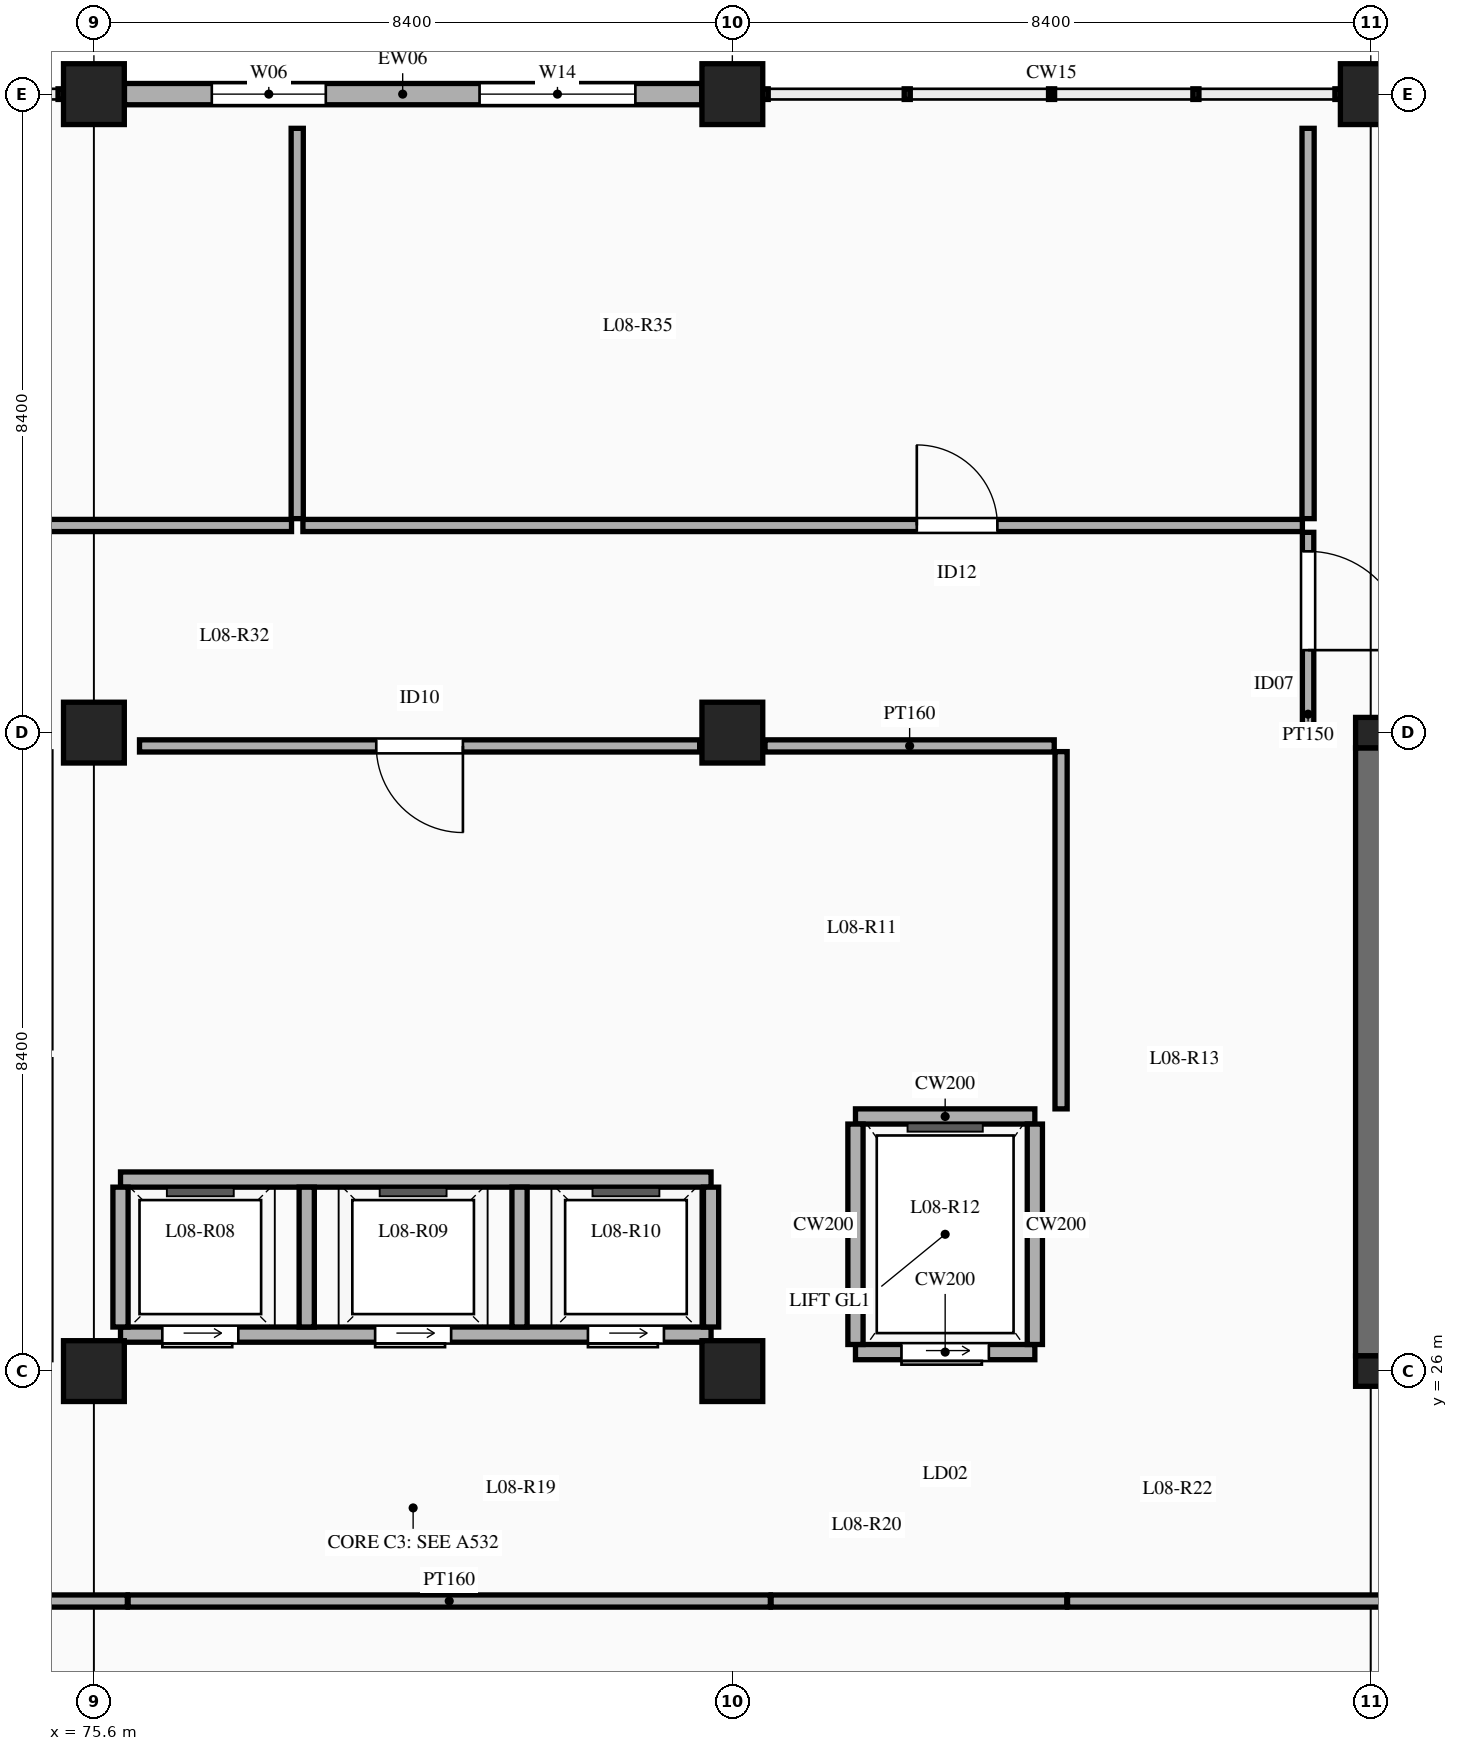
"""IFC4 building model, lengths in metres.
Left out: names, types, materials, properties, quantities, classifications, styles, units other than length and angle.
Written with IfcOpenShell. Run it as: python <this file> out.ifc"""

import sys

from ifc_helpers import new_model, si_unit, direction, frame, frame_2d, origin, origin_2d, place, context, subcontext, project, spatial, rectangle, extrude, element, fill, save


model = new_model("IFC4")
c1 = context("Model", 3, precision=1e-05, world=origin(), true_north=direction((0.0, 1.0)))
c2 = subcontext(c1, "Body", "Model", "MODEL_VIEW")
j1 = project(units=[si_unit("LENGTHUNIT", "METRE"), si_unit("PLANEANGLEUNIT", "RADIAN")], contexts=[c1])
p1 = place(None, origin())
s1 = spatial("IfcSite", under=j1, at=p1, CompositionType="ELEMENT")
p2 = place(p1, origin())
s2 = spatial("IfcBuilding", under=s1, at=p2, CompositionType="ELEMENT")
p3 = place(p2, frame((0.0, 0.0, 37.5)))
s3 = spatial("IfcBuildingStorey", under=s2, at=p3, CompositionType="ELEMENT", Elevation=37.5)
for number, where, z_axis, x_axis in (
    (1, (75.6, 26.0, 0.0), (0.0, 0.0, 1.0), (1.0, 0.0, 0.0)),
    (2, (75.6, 34.4, 0.0), (0.0, 0.0, 1.0), (1.0, 0.0, 0.0)),
    (3, (75.6, 42.8, 0.0), (0.0, 0.0, 1.0), (1.0, 0.0, 0.0)),
    (4, (84.0, 26.0, 0.0), (0.0, 0.0, 1.0), (1.0, 0.0, 0.0)),
    (5, (84.0, 34.4, 0.0), (0.0, 0.0, 1.0), (1.0, 0.0, 0.0)),
    (6, (84.0, 42.8, 0.0), (0.0, 0.0, 1.0), (1.0, 0.0, 0.0)),
):
    element("IfcColumn", number, at=place(p3, frame(where, z_axis=z_axis, x_axis=x_axis)), inside=s3, PredefinedType="COLUMN", context=c2, shape_type="SweptSolid", body=[
        extrude(rectangle(XDim=0.8, YDim=0.8, at=origin_2d()), origin(), (0.0, 0.0, 1.0), 4.5),
    ])
for number, where, z_axis, x_axis in (
    (7, (92.4, 26.0, 0.0), (0.0, 0.0, 1.0), (1.0, 0.0, 0.0)),
    (8, (92.4, 34.4, 0.0), (0.0, 0.0, 1.0), (1.0, 0.0, 0.0)),
):
    element("IfcColumn", number, at=place(p3, frame(where, z_axis=z_axis, x_axis=x_axis)), inside=s3, PredefinedType="COLUMN", context=c2, shape_type="SweptSolid", body=[
        extrude(rectangle(XDim=0.4, YDim=0.4, at=origin_2d()), origin(), (0.0, 0.0, 1.0), 4.5),
    ])
p4 = place(p3, frame((92.4, 42.8, 0.0), z_axis=(0.0, 0.0, 1.0), x_axis=(1.0, 0.0, 0.0)))
e9 = element("IfcColumn", 9, at=p4, inside=s3, PredefinedType="COLUMN", context=c2, shape_type="SweptSolid", body=[
    extrude(rectangle(XDim=0.8, YDim=0.8, at=origin_2d()), origin(), (0.0, 0.0, 1.0), 4.5),
])
p5 = place(p3, frame((92.4, 26.2, 0.0), z_axis=(0.0, 0.0, 1.0), x_axis=(0.0, 1.0, 0.0)))
e10 = element("IfcWall", 10, at=p5, inside=s3, PredefinedType="SHEAR", context=c2, shape_type="SweptSolid", body=[
    extrude(rectangle(XDim=8.0, YDim=0.4, at=frame_2d((4.0, 0.0))), origin(), (0.0, 0.0, 1.0), 4.5),
])
p6 = place(p3, frame((76.002, 42.8, 0.0), z_axis=(0.0, 0.0, 1.0), x_axis=(1.0, 0.0, 0.0)))
e11 = element("IfcWall", 11, at=p6, inside=s3, PredefinedType="ELEMENTEDWALL", context=c2, shape_type="SweptSolid", body=[
    extrude(rectangle(XDim=7.596, YDim=0.28, at=frame_2d((3.798, 0.0))), origin(), (0.0, 0.0, 1.0), 3.55),
])
p7 = place(p6, frame((1.149, 0.0, 0.9)))
e12 = element("IfcOpeningElement", 12, at=p7, cuts=e11, PredefinedType="OPENING", context=c2, shape_type="SweptSolid", body=[
    extrude(rectangle(XDim=1.5, YDim=2.0, at=frame_2d((0.75, 1.0))), frame((0.0, 0.15, 0.0), z_axis=(0.0, -1.0, 0.0), x_axis=(1.0, 0.0, 0.0)), (0.0, 0.0, 1.0), 0.3),
])
p8 = place(p6, frame((4.672, 0.0, 0.9)))
e13 = element("IfcOpeningElement", 13, at=p8, cuts=e11, PredefinedType="OPENING", context=c2, shape_type="SweptSolid", body=[
    extrude(rectangle(XDim=2.05, YDim=2.1, at=frame_2d((1.025, 1.05))), frame((0.0, 0.15, 0.0), z_axis=(0.0, -1.0, 0.0), x_axis=(1.0, 0.0, 0.0)), (0.0, 0.0, 1.0), 0.3),
])
p9 = place(p3, frame((75.95, 26.48, 0.0), z_axis=(0.0, 0.0, 1.0), x_axis=(1.0, 0.0, 0.0)))
e14 = element("IfcWall", 14, at=p9, inside=s3, PredefinedType="SOLIDWALL", context=c2, shape_type="SweptSolid", body=[
    extrude(rectangle(XDim=7.77, YDim=0.2, at=frame_2d((3.885, 0.0))), origin(), (0.0, 0.0, 1.0), 4.3),
])
p10 = place(p9, frame((0.55, 0.0, 0.0)))
e15 = element("IfcOpeningElement", 15, at=p10, cuts=e14, PredefinedType="OPENING", context=c2, shape_type="SweptSolid", body=[
    extrude(rectangle(XDim=1.0, YDim=2.15, at=frame_2d((0.5, 1.075))), frame((0.0, 0.11, 0.0), z_axis=(0.0, -1.0, 0.0), x_axis=(1.0, 0.0, 0.0)), (0.0, 0.0, 1.0), 0.22),
])
p11 = place(p9, frame((3.35, 0.0, 0.0)))
e16 = element("IfcOpeningElement", 16, at=p11, cuts=e14, PredefinedType="OPENING", context=c2, shape_type="SweptSolid", body=[
    extrude(rectangle(XDim=1.0, YDim=2.15, at=frame_2d((0.5, 1.075))), frame((0.0, 0.11, 0.0), z_axis=(0.0, -1.0, 0.0), x_axis=(1.0, 0.0, 0.0)), (0.0, 0.0, 1.0), 0.22),
])
p12 = place(p9, frame((6.15, 0.0, 0.0)))
e17 = element("IfcOpeningElement", 17, at=p12, cuts=e14, PredefinedType="OPENING", context=c2, shape_type="SweptSolid", body=[
    extrude(rectangle(XDim=1.0, YDim=2.15, at=frame_2d((0.5, 1.075))), frame((0.0, 0.11, 0.0), z_axis=(0.0, -1.0, 0.0), x_axis=(1.0, 0.0, 0.0)), (0.0, 0.0, 1.0), 0.22),
])
p13 = place(p3, frame((75.95, 28.52, 0.0), z_axis=(0.0, 0.0, 1.0), x_axis=(1.0, 0.0, 0.0)))
e18 = element("IfcWall", 18, at=p13, inside=s3, PredefinedType="SOLIDWALL", context=c2, shape_type="SweptSolid", body=[
    extrude(rectangle(XDim=7.77, YDim=0.2, at=frame_2d((3.885, 0.0))), origin(), (0.0, 0.0, 1.0), 4.3),
])
for number, where, z_axis, x_axis in (
    (19, (75.95, 26.58, 0.0), (0.0, 0.0, 1.0), (0.0, 1.0, 0.0)),
    (20, (78.4, 26.58, 0.0), (0.0, 0.0, 1.0), (0.0, 1.0, 0.0)),
    (21, (81.2, 26.58, 0.0), (0.0, 0.0, 1.0), (0.0, 1.0, 0.0)),
):
    element("IfcWall", number, at=place(p3, frame(where, z_axis=z_axis, x_axis=x_axis)), inside=s3, PredefinedType="SOLIDWALL", context=c2, shape_type="SweptSolid", body=[
        extrude(rectangle(XDim=1.84, YDim=0.2, at=frame_2d((0.92, 0.0))), origin(), (0.0, 0.0, 1.0), 4.3),
    ])
p14 = place(p3, frame((83.72, 26.58, 0.0), z_axis=(0.0, 0.0, 1.0), x_axis=(0.0, 1.0, 0.0)))
e22 = element("IfcWall", 22, at=p14, inside=s3, PredefinedType="SOLIDWALL", context=c2, shape_type="SweptSolid", body=[
    extrude(rectangle(XDim=1.84, YDim=0.2, at=frame_2d((0.92, 0.0))), origin(), (0.0, 0.0, 1.0), 3.83),
])
p15 = place(p3, frame((85.62, 26.25, 0.0), z_axis=(0.0, 0.0, 1.0), x_axis=(1.0, 0.0, 0.0)))
e23 = element("IfcWall", 23, at=p15, inside=s3, PredefinedType="SOLIDWALL", context=c2, shape_type="SweptSolid", body=[
    extrude(rectangle(XDim=2.36, YDim=0.2, at=frame_2d((1.18, 0.0))), origin(), (0.0, 0.0, 1.0), 3.78),
])
p16 = place(p15, frame((0.605, 0.0, 0.0)))
e24 = element("IfcOpeningElement", 24, at=p16, cuts=e23, PredefinedType="OPENING", context=c2, shape_type="SweptSolid", body=[
    extrude(rectangle(XDim=1.15, YDim=2.2, at=frame_2d((0.575, 1.1))), frame((0.0, 0.11, 0.0), z_axis=(0.0, -1.0, 0.0), x_axis=(1.0, 0.0, 0.0)), (0.0, 0.0, 1.0), 0.22),
])
p17 = place(p3, frame((85.62, 29.35, 0.0), z_axis=(0.0, 0.0, 1.0), x_axis=(1.0, 0.0, 0.0)))
e25 = element("IfcWall", 25, at=p17, inside=s3, PredefinedType="SOLIDWALL", context=c2, shape_type="SweptSolid", body=[
    extrude(rectangle(XDim=2.36, YDim=0.2, at=frame_2d((1.18, 0.0))), origin(), (0.0, 0.0, 1.0), 4.3),
])
p18 = place(p3, frame((85.62, 26.35, 0.0), z_axis=(0.0, 0.0, 1.0), x_axis=(0.0, 1.0, 0.0)))
e26 = element("IfcWall", 26, at=p18, inside=s3, PredefinedType="SOLIDWALL", context=c2, shape_type="SweptSolid", body=[
    extrude(rectangle(XDim=2.9, YDim=0.2, at=frame_2d((1.45, 0.0))), origin(), (0.0, 0.0, 1.0), 4.3),
])
p19 = place(p3, frame((87.98, 26.35, 0.0), z_axis=(0.0, 0.0, 1.0), x_axis=(0.0, 1.0, 0.0)))
e27 = element("IfcWall", 27, at=p19, inside=s3, PredefinedType="SOLIDWALL", context=c2, shape_type="SweptSolid", body=[
    extrude(rectangle(XDim=2.9, YDim=0.2, at=frame_2d((1.45, 0.0))), origin(), (0.0, 0.0, 1.0), 3.98),
])
p20 = place(p3, frame((88.325, 29.45, 0.0), z_axis=(0.0, 0.0, 1.0), x_axis=(0.0, 1.0, 0.0)))
e28 = element("IfcWall", 28, at=p20, inside=s3, PredefinedType="PARTITIONING", context=c2, shape_type="SweptSolid", body=[
    extrude(rectangle(XDim=4.7, YDim=0.16, at=frame_2d((2.35, 0.0))), origin(), (0.0, 0.0, 1.0), 3.45),
])
p21 = place(p3, frame((76.2, 34.225, 0.0), z_axis=(0.0, 0.0, 1.0), x_axis=(1.0, 0.0, 0.0)))
e29 = element("IfcWall", 29, at=p21, inside=s3, PredefinedType="PARTITIONING", context=c2, shape_type="SweptSolid", body=[
    extrude(rectangle(XDim=7.37, YDim=0.16, at=frame_2d((3.685, 0.0))), origin(), (0.0, 0.0, 1.0), 3.45),
])
p22 = place(p21, frame((3.115, 0.0, 0.0)))
e30 = element("IfcOpeningElement", 30, at=p22, cuts=e29, PredefinedType="OPENING", context=c2, shape_type="SweptSolid", body=[
    extrude(rectangle(XDim=1.14, YDim=2.22, at=frame_2d((0.57, 1.11))), frame((0.0, 0.09, 0.0), z_axis=(0.0, -1.0, 0.0), x_axis=(1.0, 0.0, 0.0)), (0.0, 0.0, 1.0), 0.18),
])
p23 = place(p3, frame((84.43, 34.225, 0.0), z_axis=(0.0, 0.0, 1.0), x_axis=(1.0, 0.0, 0.0)))
e31 = element("IfcWall", 31, at=p23, inside=s3, PredefinedType="PARTITIONING", context=c2, shape_type="SweptSolid", body=[
    extrude(rectangle(XDim=3.805, YDim=0.16, at=frame_2d((1.903, 0.0))), origin(), (0.0, 0.0, 1.0), 3.45),
])
p24 = place(p3, frame((76.05, 22.975, 0.0), z_axis=(0.0, 0.0, 1.0), x_axis=(1.0, 0.0, 0.0)))
e32 = element("IfcWall", 32, at=p24, inside=s3, PredefinedType="PARTITIONING", context=c2, shape_type="SweptSolid", body=[
    extrude(rectangle(XDim=8.45, YDim=0.16, at=frame_2d((4.225, 0.0))), origin(), (0.0, 0.0, 1.0), 3.45),
])
p25 = place(p3, frame((84.51, 22.975, 0.0), z_axis=(0.0, 0.0, 1.0), x_axis=(1.0, 0.0, 0.0)))
e33 = element("IfcWall", 33, at=p25, inside=s3, PredefinedType="PARTITIONING", context=c2, shape_type="SweptSolid", body=[
    extrude(rectangle(XDim=3.89, YDim=0.16, at=frame_2d((1.945, 0.0))), origin(), (0.0, 0.0, 1.0), 3.45),
])
p26 = place(p3, frame((58.45, 22.975, 0.0), z_axis=(0.0, 0.0, 1.0), x_axis=(1.0, 0.0, 0.0)))
e34 = element("IfcWall", 34, at=p26, inside=s3, PredefinedType="PARTITIONING", context=c2, shape_type="SweptSolid", body=[
    extrude(rectangle(XDim=17.59, YDim=0.16, at=frame_2d((8.795, 0.0))), origin(), (0.0, 0.0, 1.0), 3.45),
])
p27 = place(p26, frame((10.018, 0.0, 0.0)))
e35 = element("IfcOpeningElement", 35, at=p27, cuts=e34, PredefinedType="OPENING", context=c2, shape_type="SweptSolid", body=[
    extrude(rectangle(XDim=1.16, YDim=2.2, at=frame_2d((0.58, 1.1))), frame((0.0, 0.09, 0.0), z_axis=(0.0, -1.0, 0.0), x_axis=(1.0, 0.0, 0.0)), (0.0, 0.0, 1.0), 0.18),
])
p28 = place(p3, frame((88.41, 22.975, 0.0), z_axis=(0.0, 0.0, 1.0), x_axis=(1.0, 0.0, 0.0)))
e36 = element("IfcWall", 36, at=p28, inside=s3, PredefinedType="PARTITIONING", context=c2, shape_type="SweptSolid", body=[
    extrude(rectangle(XDim=4.39, YDim=0.16, at=frame_2d((2.195, 0.0))), origin(), (0.0, 0.0, 1.0), 3.45),
])
p29 = place(p3, frame((63.02, 37.125, 0.0), z_axis=(0.0, 0.0, 1.0), x_axis=(1.0, 0.0, 0.0)))
e37 = element("IfcWall", 37, at=p29, inside=s3, PredefinedType="PARTITIONING", context=c2, shape_type="SweptSolid", body=[
    extrude(rectangle(XDim=15.18, YDim=0.16, at=frame_2d((7.59, 0.0))), origin(), (0.0, 0.0, 1.0), 3.45),
])
p30 = place(p29, frame((7.01, 0.0, 0.0)))
e38 = element("IfcOpeningElement", 38, at=p30, cuts=e37, PredefinedType="OPENING", context=c2, shape_type="SweptSolid", body=[
    extrude(rectangle(XDim=1.16, YDim=2.2, at=frame_2d((0.58, 1.1))), frame((0.0, 0.09, 0.0), z_axis=(0.0, -1.0, 0.0), x_axis=(1.0, 0.0, 0.0)), (0.0, 0.0, 1.0), 0.18),
])
p31 = place(p3, frame((78.35, 37.125, 0.0), z_axis=(0.0, 0.0, 1.0), x_axis=(1.0, 0.0, 0.0)))
e39 = element("IfcWall", 39, at=p31, inside=s3, PredefinedType="PARTITIONING", context=c2, shape_type="SweptSolid", body=[
    extrude(rectangle(XDim=13.15, YDim=0.16, at=frame_2d((6.575, 0.0))), origin(), (0.0, 0.0, 1.0), 3.45),
])
p32 = place(p31, frame((8.077, 0.0, 0.0)))
e40 = element("IfcOpeningElement", 40, at=p32, cuts=e39, PredefinedType="OPENING", context=c2, shape_type="SweptSolid", body=[
    extrude(rectangle(XDim=1.06, YDim=2.18, at=frame_2d((0.53, 1.09))), frame((0.0, 0.09, 0.0), z_axis=(0.0, -1.0, 0.0), x_axis=(1.0, 0.0, 0.0)), (0.0, 0.0, 1.0), 0.18),
])
p33 = place(p3, frame((91.575, 34.3, 0.0), z_axis=(0.0, 0.0, 1.0), x_axis=(0.0, 1.0, 0.0)))
e41 = element("IfcWall", 41, at=p33, inside=s3, PredefinedType="PARTITIONING", context=c2, shape_type="SweptSolid", body=[
    extrude(rectangle(XDim=2.735, YDim=0.15, at=frame_2d((1.367, 0.0))), origin(), (0.0, 0.0, 1.0), 3.45),
])
p34 = place(p33, frame((1.185, 0.0, 0.0)))
e42 = element("IfcOpeningElement", 42, at=p34, cuts=e41, PredefinedType="OPENING", context=c2, shape_type="SweptSolid", body=[
    extrude(rectangle(XDim=1.3, YDim=2.25, at=frame_2d((0.65, 1.125))), frame((0.0, 0.085, 0.0), z_axis=(0.0, -1.0, 0.0), x_axis=(1.0, 0.0, 0.0)), (0.0, 0.0, 1.0), 0.17),
])
for number, where, z_axis, x_axis in (
    (43, (78.275, 37.215, 0.0), (0.0, 0.0, 1.0), (0.0, 1.0, 0.0)),
    (44, (91.575, 37.215, 0.0), (0.0, 0.0, 1.0), (0.0, 1.0, 0.0)),
):
    element("IfcWall", number, at=place(p3, frame(where, z_axis=z_axis, x_axis=x_axis)), inside=s3, PredefinedType="PARTITIONING", context=c2, shape_type="SweptSolid", body=[
        extrude(rectangle(XDim=5.135, YDim=0.16, at=frame_2d((2.567, 0.0))), origin(), (0.0, 0.0, 1.0), 3.45),
    ])
p35 = place(p7, origin())
e45 = element("IfcWindow", 45, at=p35, inside=s3, PartitioningType="DOUBLE_PANEL_VERTICAL", PredefinedType="WINDOW", context=c2, shape_type="SweptSolid", body=[
    extrude(rectangle(XDim=1.5, YDim=2.0, at=frame_2d((0.75, 1.0))), frame((0.0, 0.03, 0.0), z_axis=(0.0, -1.0, 0.0), x_axis=(1.0, 0.0, 0.0)), (0.0, 0.0, 1.0), 0.06),
])
fill(e12, e45)
p36 = place(p8, origin())
e46 = element("IfcWindow", 46, at=p36, inside=s3, PartitioningType="TRIPLE_PANEL_VERTICAL", PredefinedType="WINDOW", context=c2, shape_type="SweptSolid", body=[
    extrude(rectangle(XDim=2.05, YDim=2.1, at=frame_2d((1.025, 1.05))), frame((0.0, 0.03, 0.0), z_axis=(0.0, -1.0, 0.0), x_axis=(1.0, 0.0, 0.0)), (0.0, 0.0, 1.0), 0.06),
])
fill(e13, e46)
p37 = place(p10, frame((1.0, 0.0, 0.0), z_axis=(0.0, 0.0, 1.0), x_axis=(-1.0, 0.0, 0.0)))
e47 = element("IfcDoor", 47, at=p37, inside=s3, OperationType="SLIDING_TO_LEFT", PredefinedType="DOOR", context=c2, shape_type="SweptSolid", body=[
    extrude(rectangle(XDim=1.0, YDim=2.15, at=frame_2d((0.5, 1.075))), frame((0.0, 0.025, 0.0), z_axis=(0.0, -1.0, 0.0), x_axis=(1.0, 0.0, 0.0)), (0.0, 0.0, 1.0), 0.05),
])
fill(e15, e47)
p38 = place(p11, frame((1.0, 0.0, 0.0), z_axis=(0.0, 0.0, 1.0), x_axis=(-1.0, 0.0, 0.0)))
e48 = element("IfcDoor", 48, at=p38, inside=s3, OperationType="SLIDING_TO_LEFT", PredefinedType="DOOR", context=c2, shape_type="SweptSolid", body=[
    extrude(rectangle(XDim=1.0, YDim=2.15, at=frame_2d((0.5, 1.075))), frame((0.0, 0.025, 0.0), z_axis=(0.0, -1.0, 0.0), x_axis=(1.0, 0.0, 0.0)), (0.0, 0.0, 1.0), 0.05),
])
fill(e16, e48)
p39 = place(p12, frame((1.0, 0.0, 0.0), z_axis=(0.0, 0.0, 1.0), x_axis=(-1.0, 0.0, 0.0)))
e49 = element("IfcDoor", 49, at=p39, inside=s3, OperationType="SLIDING_TO_LEFT", PredefinedType="DOOR", context=c2, shape_type="SweptSolid", body=[
    extrude(rectangle(XDim=1.0, YDim=2.15, at=frame_2d((0.5, 1.075))), frame((0.0, 0.025, 0.0), z_axis=(0.0, -1.0, 0.0), x_axis=(1.0, 0.0, 0.0)), (0.0, 0.0, 1.0), 0.05),
])
fill(e17, e49)
p40 = place(p16, frame((1.15, 0.0, 0.0), z_axis=(0.0, 0.0, 1.0), x_axis=(-1.0, 0.0, 0.0)))
e50 = element("IfcDoor", 50, at=p40, inside=s3, OperationType="SLIDING_TO_LEFT", PredefinedType="DOOR", context=c2, shape_type="SweptSolid", body=[
    extrude(rectangle(XDim=1.15, YDim=2.2, at=frame_2d((0.575, 1.1))), frame((0.0, 0.025, 0.0), z_axis=(0.0, -1.0, 0.0), x_axis=(1.0, 0.0, 0.0)), (0.0, 0.0, 1.0), 0.05),
])
fill(e24, e50)
p41 = place(p22, frame((1.14, 0.0, 0.0), z_axis=(0.0, 0.0, 1.0), x_axis=(-1.0, 0.0, 0.0)))
e51 = element("IfcDoor", 51, at=p41, inside=s3, OperationType="SINGLE_SWING_LEFT", PredefinedType="DOOR", context=c2, shape_type="SweptSolid", body=[
    extrude(rectangle(XDim=1.14, YDim=2.22, at=frame_2d((0.57, 1.11))), frame((0.0, 0.025, 0.0), z_axis=(0.0, -1.0, 0.0), x_axis=(1.0, 0.0, 0.0)), (0.0, 0.0, 1.0), 0.05),
])
fill(e30, e51)
p42 = place(p32, origin())
e52 = element("IfcDoor", 52, at=p42, inside=s3, OperationType="SINGLE_SWING_LEFT", PredefinedType="DOOR", context=c2, shape_type="SweptSolid", body=[
    extrude(rectangle(XDim=1.06, YDim=2.18, at=frame_2d((0.53, 1.09))), frame((0.0, 0.025, 0.0), z_axis=(0.0, -1.0, 0.0), x_axis=(1.0, 0.0, 0.0)), (0.0, 0.0, 1.0), 0.05),
])
fill(e40, e52)
p43 = place(p34, frame((1.3, 0.0, 0.0), z_axis=(0.0, 0.0, 1.0), x_axis=(-1.0, 0.0, 0.0)))
e53 = element("IfcDoor", 53, at=p43, inside=s3, OperationType="SINGLE_SWING_RIGHT", PredefinedType="DOOR", context=c2, shape_type="SweptSolid", body=[
    extrude(rectangle(XDim=1.3, YDim=2.25, at=frame_2d((0.65, 1.125))), frame((0.0, 0.025, 0.0), z_axis=(0.0, -1.0, 0.0), x_axis=(1.0, 0.0, 0.0)), (0.0, 0.0, 1.0), 0.05),
])
fill(e42, e53)
save(model, sys.argv[1])
